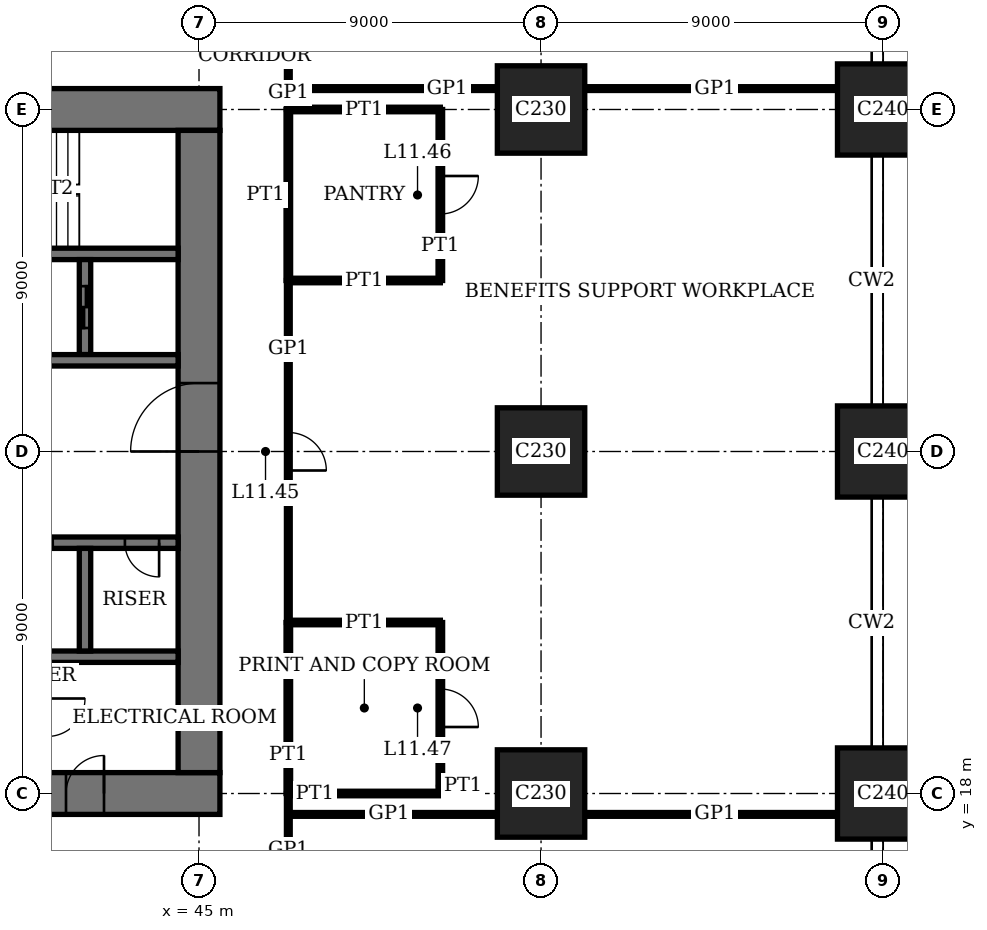
"""IFC4 building model, lengths in metres.
Left out: names, types, materials, properties, quantities, classifications, styles, units other than length and angle.
Written with IfcOpenShell. Run it as: python <this file> out.ifc"""

import sys

from ifc_helpers import new_model, si_unit, direction, frame, frame_2d, origin, origin_2d, place, context, subcontext, project, spatial, rectangle, extrude, element, fill, save


model = new_model("IFC4")
c1 = context("Model", 3, precision=1e-05, world=origin(), true_north=direction((0.0, 1.0)))
c2 = subcontext(c1, "Body", "Model", "MODEL_VIEW")
j1 = project(units=[si_unit("LENGTHUNIT", "METRE"), si_unit("PLANEANGLEUNIT", "RADIAN")], contexts=[c1])
p1 = place(None, origin())
s1 = spatial("IfcSite", under=j1, at=p1, CompositionType="ELEMENT")
p2 = place(p1, origin())
s2 = spatial("IfcBuilding", under=s1, at=p2, CompositionType="ELEMENT")
p3 = place(p2, frame((0.0, 0.0, 47.8)))
s3 = spatial("IfcBuildingStorey", under=s2, at=p3, CompositionType="ELEMENT", Elevation=47.8)
for number, where, z_axis, x_axis in (
    (1, (54.0, 18.0, 0.0), (0.0, 0.0, 1.0), (1.0, 0.0, 0.0)),
    (2, (54.0, 27.0, 0.0), (0.0, 0.0, 1.0), (1.0, 0.0, 0.0)),
    (3, (54.0, 36.0, 0.0), (0.0, 0.0, 1.0), (1.0, 0.0, 0.0)),
):
    element("IfcColumn", number, at=place(p3, frame(where, z_axis=z_axis, x_axis=x_axis)), inside=s3, PredefinedType="COLUMN", context=c2, shape_type="SweptSolid", body=[
        extrude(rectangle(XDim=2.3, YDim=2.3, at=origin_2d()), origin(), (0.0, 0.0, 1.0), 4.0),
    ])
for number, where, z_axis, x_axis in (
    (4, (63.0, 18.0, 0.0), (0.0, 0.0, 1.0), (1.0, 0.0, 0.0)),
    (5, (63.0, 27.0, 0.0), (0.0, 0.0, 1.0), (1.0, 0.0, 0.0)),
    (6, (63.0, 36.0, 0.0), (0.0, 0.0, 1.0), (1.0, 0.0, 0.0)),
):
    element("IfcColumn", number, at=place(p3, frame(where, z_axis=z_axis, x_axis=x_axis)), inside=s3, PredefinedType="COLUMN", context=c2, shape_type="SweptSolid", body=[
        extrude(rectangle(XDim=2.4, YDim=2.4, at=origin_2d()), origin(), (0.0, 0.0, 1.0), 4.0),
    ])
p4 = place(p3, frame((17.45, 18.0, 0.0), z_axis=(0.0, 0.0, 1.0), x_axis=(1.0, 0.0, 0.0)))
e7 = element("IfcWall", 7, at=p4, inside=s3, PredefinedType="SHEAR", context=c2, shape_type="SweptSolid", body=[
    extrude(rectangle(XDim=28.1, YDim=1.1, at=frame_2d((14.05, 0.0))), origin(), (0.0, 0.0, 1.0), 4.0),
])
p5 = place(p4, frame((11.55, 0.0, 0.0)))
e8 = element("IfcOpeningElement", 8, at=p5, cuts=e7, PredefinedType="OPENING", context=c2, shape_type="SweptSolid", body=[
    extrude(rectangle(XDim=1.0, YDim=2.4, at=frame_2d((0.5, 1.2))), frame((0.0, 0.56, 0.0), z_axis=(0.0, -1.0, 0.0), x_axis=(1.0, 0.0, 0.0)), (0.0, 0.0, 1.0), 1.12),
])
p6 = place(p4, frame((16.55, 0.0, 0.0)))
e9 = element("IfcOpeningElement", 9, at=p6, cuts=e7, PredefinedType="OPENING", context=c2, shape_type="SweptSolid", body=[
    extrude(rectangle(XDim=1.0, YDim=2.4, at=frame_2d((0.5, 1.2))), frame((0.0, 0.56, 0.0), z_axis=(0.0, -1.0, 0.0), x_axis=(1.0, 0.0, 0.0)), (0.0, 0.0, 1.0), 1.12),
])
p7 = place(p4, frame((20.0, 0.0, 0.0)))
e10 = element("IfcOpeningElement", 10, at=p7, cuts=e7, PredefinedType="OPENING", context=c2, shape_type="SweptSolid", body=[
    extrude(rectangle(XDim=1.1, YDim=2.4, at=frame_2d((0.55, 1.2))), frame((0.0, 0.56, 0.0), z_axis=(0.0, -1.0, 0.0), x_axis=(1.0, 0.0, 0.0)), (0.0, 0.0, 1.0), 1.12),
])
p8 = place(p4, frame((24.05, 0.0, 0.0)))
e11 = element("IfcOpeningElement", 11, at=p8, cuts=e7, PredefinedType="OPENING", context=c2, shape_type="SweptSolid", body=[
    extrude(rectangle(XDim=1.0, YDim=2.4, at=frame_2d((0.5, 1.2))), frame((0.0, 0.56, 0.0), z_axis=(0.0, -1.0, 0.0), x_axis=(1.0, 0.0, 0.0)), (0.0, 0.0, 1.0), 1.12),
])
p9 = place(p3, frame((45.55, 36.0, 0.0), z_axis=(0.0, 0.0, 1.0), x_axis=(-1.0, 0.0, 0.0)))
e12 = element("IfcWall", 12, at=p9, inside=s3, PredefinedType="SHEAR", context=c2, shape_type="SweptSolid", body=[
    extrude(rectangle(XDim=28.1, YDim=1.1, at=frame_2d((14.05, 0.0))), origin(), (0.0, 0.0, 1.0), 4.0),
])
p10 = place(p9, frame((11.55, 0.0, 0.0)))
e13 = element("IfcOpeningElement", 13, at=p10, cuts=e12, PredefinedType="OPENING", context=c2, shape_type="SweptSolid", body=[
    extrude(rectangle(XDim=1.0, YDim=2.4, at=frame_2d((0.5, 1.2))), frame((0.0, 0.56, 0.0), z_axis=(0.0, -1.0, 0.0), x_axis=(1.0, 0.0, 0.0)), (0.0, 0.0, 1.0), 1.12),
])
p11 = place(p9, frame((16.55, 0.0, 0.0)))
e14 = element("IfcOpeningElement", 14, at=p11, cuts=e12, PredefinedType="OPENING", context=c2, shape_type="SweptSolid", body=[
    extrude(rectangle(XDim=1.0, YDim=2.4, at=frame_2d((0.5, 1.2))), frame((0.0, 0.56, 0.0), z_axis=(0.0, -1.0, 0.0), x_axis=(1.0, 0.0, 0.0)), (0.0, 0.0, 1.0), 1.12),
])
p12 = place(p9, frame((20.0, 0.0, 0.0)))
e15 = element("IfcOpeningElement", 15, at=p12, cuts=e12, PredefinedType="OPENING", context=c2, shape_type="SweptSolid", body=[
    extrude(rectangle(XDim=1.1, YDim=2.4, at=frame_2d((0.55, 1.2))), frame((0.0, 0.56, 0.0), z_axis=(0.0, -1.0, 0.0), x_axis=(1.0, 0.0, 0.0)), (0.0, 0.0, 1.0), 1.12),
])
p13 = place(p9, frame((24.05, 0.0, 0.0)))
e16 = element("IfcOpeningElement", 16, at=p13, cuts=e12, PredefinedType="OPENING", context=c2, shape_type="SweptSolid", body=[
    extrude(rectangle(XDim=1.0, YDim=2.4, at=frame_2d((0.5, 1.2))), frame((0.0, 0.56, 0.0), z_axis=(0.0, -1.0, 0.0), x_axis=(1.0, 0.0, 0.0)), (0.0, 0.0, 1.0), 1.12),
])
p14 = place(p3, frame((45.0, 18.55, 0.0), z_axis=(0.0, 0.0, 1.0), x_axis=(0.0, 1.0, 0.0)))
e17 = element("IfcWall", 17, at=p14, inside=s3, PredefinedType="SHEAR", context=c2, shape_type="SweptSolid", body=[
    extrude(rectangle(XDim=16.9, YDim=1.1, at=frame_2d((8.45, 0.0))), origin(), (0.0, 0.0, 1.0), 4.0),
])
p15 = place(p14, frame((8.45, 0.0, 0.0)))
e18 = element("IfcOpeningElement", 18, at=p15, cuts=e17, PredefinedType="OPENING", context=c2, shape_type="SweptSolid", body=[
    extrude(rectangle(XDim=1.8, YDim=2.4, at=frame_2d((0.9, 1.2))), frame((0.0, 0.56, 0.0), z_axis=(0.0, -1.0, 0.0), x_axis=(1.0, 0.0, 0.0)), (0.0, 0.0, 1.0), 1.12),
])
p16 = place(p3, frame((36.15, 32.2, 0.0), z_axis=(0.0, 0.0, 1.0), x_axis=(1.0, 0.0, 0.0)))
e19 = element("IfcWall", 19, at=p16, inside=s3, PredefinedType="SHEAR", context=c2, shape_type="SweptSolid", body=[
    extrude(rectangle(XDim=8.3, YDim=0.3, at=frame_2d((4.15, 0.0))), origin(), (0.0, 0.0, 1.0), 4.0),
])
p17 = place(p16, frame((0.45, 0.0, 0.0)))
e20 = element("IfcOpeningElement", 20, at=p17, cuts=e19, PredefinedType="OPENING", context=c2, shape_type="SweptSolid", body=[
    extrude(rectangle(XDim=1.0, YDim=2.4, at=frame_2d((0.5, 1.2))), frame((0.0, 0.16, 0.0), z_axis=(0.0, -1.0, 0.0), x_axis=(1.0, 0.0, 0.0)), (0.0, 0.0, 1.0), 0.32),
])
p18 = place(p3, frame((42.0, 29.55, 0.0), z_axis=(0.0, 0.0, 1.0), x_axis=(0.0, 1.0, 0.0)))
e21 = element("IfcWall", 21, at=p18, inside=s3, PredefinedType="SHEAR", context=c2, shape_type="SweptSolid", body=[
    extrude(rectangle(XDim=2.5, YDim=0.3, at=frame_2d((1.25, 0.0))), origin(), (0.0, 0.0, 1.0), 4.0),
])
p19 = place(p18, frame((0.7, 0.0, 0.0)))
e22 = element("IfcOpeningElement", 22, at=p19, cuts=e21, PredefinedType="OPENING", context=c2, shape_type="SweptSolid", body=[
    extrude(rectangle(XDim=1.1, YDim=2.4, at=frame_2d((0.55, 1.2))), frame((0.0, 0.16, 0.0), z_axis=(0.0, -1.0, 0.0), x_axis=(1.0, 0.0, 0.0)), (0.0, 0.0, 1.0), 0.32),
])
p20 = place(p3, frame((18.55, 24.6, 0.0), z_axis=(0.0, 0.0, 1.0), x_axis=(1.0, 0.0, 0.0)))
e23 = element("IfcWall", 23, at=p20, inside=s3, PredefinedType="SHEAR", context=c2, shape_type="SweptSolid", body=[
    extrude(rectangle(XDim=25.9, YDim=0.3, at=frame_2d((12.95, 0.0))), origin(), (0.0, 0.0, 1.0), 4.0),
])
p21 = place(p20, frame((4.95, 0.0, 0.0)))
e24 = element("IfcOpeningElement", 24, at=p21, cuts=e23, PredefinedType="OPENING", context=c2, shape_type="SweptSolid", body=[
    extrude(rectangle(XDim=1.0, YDim=2.4, at=frame_2d((0.5, 1.2))), frame((0.0, 0.16, 0.0), z_axis=(0.0, -1.0, 0.0), x_axis=(1.0, 0.0, 0.0)), (0.0, 0.0, 1.0), 0.32),
])
p22 = place(p20, frame((24.5, 0.0, 0.0)))
e25 = element("IfcOpeningElement", 25, at=p22, cuts=e23, PredefinedType="OPENING", context=c2, shape_type="SweptSolid", body=[
    extrude(rectangle(XDim=0.9, YDim=2.1, at=frame_2d((0.45, 1.05))), frame((0.0, 0.16, 0.0), z_axis=(0.0, -1.0, 0.0), x_axis=(1.0, 0.0, 0.0)), (0.0, 0.0, 1.0), 0.32),
])
p23 = place(p20, frame((9.4, 0.0, 0.0)))
e26 = element("IfcOpeningElement", 26, at=p23, cuts=e23, PredefinedType="OPENING", context=c2, shape_type="SweptSolid", body=[
    extrude(rectangle(XDim=1.1, YDim=2.4, at=frame_2d((0.55, 1.2))), frame((0.0, 0.16, 0.0), z_axis=(0.0, -1.0, 0.0), x_axis=(1.0, 0.0, 0.0)), (0.0, 0.0, 1.0), 0.32),
])
p24 = place(p20, frame((12.4, 0.0, 0.0)))
e27 = element("IfcOpeningElement", 27, at=p24, cuts=e23, PredefinedType="OPENING", context=c2, shape_type="SweptSolid", body=[
    extrude(rectangle(XDim=1.1, YDim=2.4, at=frame_2d((0.55, 1.2))), frame((0.0, 0.16, 0.0), z_axis=(0.0, -1.0, 0.0), x_axis=(1.0, 0.0, 0.0)), (0.0, 0.0, 1.0), 0.32),
])
p25 = place(p20, frame((15.4, 0.0, 0.0)))
e28 = element("IfcOpeningElement", 28, at=p25, cuts=e23, PredefinedType="OPENING", context=c2, shape_type="SweptSolid", body=[
    extrude(rectangle(XDim=1.1, YDim=2.4, at=frame_2d((0.55, 1.2))), frame((0.0, 0.16, 0.0), z_axis=(0.0, -1.0, 0.0), x_axis=(1.0, 0.0, 0.0)), (0.0, 0.0, 1.0), 0.32),
])
p26 = place(p20, frame((18.4, 0.0, 0.0)))
e29 = element("IfcOpeningElement", 29, at=p26, cuts=e23, PredefinedType="OPENING", context=c2, shape_type="SweptSolid", body=[
    extrude(rectangle(XDim=1.1, YDim=2.4, at=frame_2d((0.55, 1.2))), frame((0.0, 0.16, 0.0), z_axis=(0.0, -1.0, 0.0), x_axis=(1.0, 0.0, 0.0)), (0.0, 0.0, 1.0), 0.32),
])
p27 = place(p20, frame((21.3, 0.0, 0.0)))
e30 = element("IfcOpeningElement", 30, at=p27, cuts=e23, PredefinedType="OPENING", context=c2, shape_type="SweptSolid", body=[
    extrude(rectangle(XDim=1.3, YDim=2.4, at=frame_2d((0.65, 1.2))), frame((0.0, 0.16, 0.0), z_axis=(0.0, -1.0, 0.0), x_axis=(1.0, 0.0, 0.0)), (0.0, 0.0, 1.0), 0.32),
])
p28 = place(p3, frame((18.55, 29.4, 0.0), z_axis=(0.0, 0.0, 1.0), x_axis=(1.0, 0.0, 0.0)))
e31 = element("IfcWall", 31, at=p28, inside=s3, PredefinedType="SHEAR", context=c2, shape_type="SweptSolid", body=[
    extrude(rectangle(XDim=25.9, YDim=0.3, at=frame_2d((12.95, 0.0))), origin(), (0.0, 0.0, 1.0), 4.0),
])
p29 = place(p28, frame((19.95, 0.0, 0.0)))
e32 = element("IfcOpeningElement", 32, at=p29, cuts=e31, PredefinedType="OPENING", context=c2, shape_type="SweptSolid", body=[
    extrude(rectangle(XDim=1.0, YDim=2.4, at=frame_2d((0.5, 1.2))), frame((0.0, 0.16, 0.0), z_axis=(0.0, -1.0, 0.0), x_axis=(1.0, 0.0, 0.0)), (0.0, 0.0, 1.0), 0.32),
])
p30 = place(p28, frame((0.5, 0.0, 0.0)))
e33 = element("IfcOpeningElement", 33, at=p30, cuts=e31, PredefinedType="OPENING", context=c2, shape_type="SweptSolid", body=[
    extrude(rectangle(XDim=0.9, YDim=2.1, at=frame_2d((0.45, 1.05))), frame((0.0, 0.16, 0.0), z_axis=(0.0, -1.0, 0.0), x_axis=(1.0, 0.0, 0.0)), (0.0, 0.0, 1.0), 0.32),
])
p31 = place(p28, frame((3.3, 0.0, 0.0)))
e34 = element("IfcOpeningElement", 34, at=p31, cuts=e31, PredefinedType="OPENING", context=c2, shape_type="SweptSolid", body=[
    extrude(rectangle(XDim=1.3, YDim=2.4, at=frame_2d((0.65, 1.2))), frame((0.0, 0.16, 0.0), z_axis=(0.0, -1.0, 0.0), x_axis=(1.0, 0.0, 0.0)), (0.0, 0.0, 1.0), 0.32),
])
p32 = place(p3, frame((27.15, 21.6, 0.0), z_axis=(0.0, 0.0, 1.0), x_axis=(1.0, 0.0, 0.0)))
e35 = element("IfcWall", 35, at=p32, inside=s3, PredefinedType="SHEAR", context=c2, shape_type="SweptSolid", body=[
    extrude(rectangle(XDim=17.3, YDim=0.3, at=frame_2d((8.65, 0.0))), origin(), (0.0, 0.0, 1.0), 4.0),
])
p33 = place(p3, frame((42.0, 21.75, 0.0), z_axis=(0.0, 0.0, 1.0), x_axis=(0.0, 1.0, 0.0)))
e36 = element("IfcWall", 36, at=p33, inside=s3, PredefinedType="SHEAR", context=c2, shape_type="SweptSolid", body=[
    extrude(rectangle(XDim=2.7, YDim=0.3, at=frame_2d((1.35, 0.0))), origin(), (0.0, 0.0, 1.0), 4.0),
])
p34 = place(p3, frame((47.35, 17.45, 0.0), z_axis=(0.0, 0.0, 1.0), x_axis=(1.0, 0.0, 0.0)))
e37 = element("IfcWall", 37, at=p34, inside=s3, PredefinedType="PARTITIONING", context=c2, shape_type="SweptSolid", body=[
    extrude(rectangle(XDim=5.5, YDim=0.1, at=frame_2d((2.75, 0.0))), origin(), (0.0, 0.0, 1.0), 3.75),
])
p35 = place(p3, frame((55.15, 17.45, 0.0), z_axis=(0.0, 0.0, 1.0), x_axis=(1.0, 0.0, 0.0)))
e38 = element("IfcWall", 38, at=p35, inside=s3, PredefinedType="PARTITIONING", context=c2, shape_type="SweptSolid", body=[
    extrude(rectangle(XDim=6.65, YDim=0.1, at=frame_2d((3.325, 0.0))), origin(), (0.0, 0.0, 1.0), 3.75),
])
p36 = place(p3, frame((47.35, 18.0, 0.0), z_axis=(0.0, 0.0, 1.0), x_axis=(1.0, 0.0, 0.0)))
e39 = element("IfcWall", 39, at=p36, inside=s3, PredefinedType="PARTITIONING", context=c2, shape_type="SweptSolid", body=[
    extrude(rectangle(XDim=4.0, YDim=0.12, at=frame_2d((2.0, 0.0))), origin(), (0.0, 0.0, 1.0), 3.05),
])
for number, where, z_axis, x_axis in (
    (40, (47.35, 22.5, 0.0), (0.0, 0.0, 1.0), (1.0, 0.0, 0.0)),
    (41, (47.35, 31.5, 0.0), (0.0, 0.0, 1.0), (1.0, 0.0, 0.0)),
):
    element("IfcWall", number, at=place(p3, frame(where, z_axis=z_axis, x_axis=x_axis)), inside=s3, PredefinedType="PARTITIONING", context=c2, shape_type="SweptSolid", body=[
        extrude(rectangle(XDim=4.0, YDim=0.12, at=frame_2d((2.0, 0.0))), origin(), (0.0, 0.0, 1.0), 3.1),
    ])
p37 = place(p3, frame((47.35, 36.0, 0.0), z_axis=(0.0, 0.0, 1.0), x_axis=(1.0, 0.0, 0.0)))
e42 = element("IfcWall", 42, at=p37, inside=s3, PredefinedType="PARTITIONING", context=c2, shape_type="SweptSolid", body=[
    extrude(rectangle(XDim=4.0, YDim=0.12, at=frame_2d((2.0, 0.0))), origin(), (0.0, 0.0, 1.0), 3.05),
])
p38 = place(p3, frame((47.35, 36.55, 0.0), z_axis=(0.0, 0.0, 1.0), x_axis=(1.0, 0.0, 0.0)))
e43 = element("IfcWall", 43, at=p38, inside=s3, PredefinedType="PARTITIONING", context=c2, shape_type="SweptSolid", body=[
    extrude(rectangle(XDim=5.5, YDim=0.1, at=frame_2d((2.75, 0.0))), origin(), (0.0, 0.0, 1.0), 3.75),
])
p39 = place(p3, frame((55.15, 36.55, 0.0), z_axis=(0.0, 0.0, 1.0), x_axis=(1.0, 0.0, 0.0)))
e44 = element("IfcWall", 44, at=p39, inside=s3, PredefinedType="PARTITIONING", context=c2, shape_type="SweptSolid", body=[
    extrude(rectangle(XDim=6.65, YDim=0.1, at=frame_2d((3.325, 0.0))), origin(), (0.0, 0.0, 1.0), 3.75),
])
for number, where, z_axis, x_axis in (
    (45, (47.35, 31.5, 0.0), (0.0, 0.0, 1.0), (0.0, 1.0, 0.0)),
    (46, (47.35, 18.0, 0.0), (0.0, 0.0, 1.0), (0.0, 1.0, 0.0)),
):
    element("IfcWall", number, at=place(p3, frame(where, z_axis=z_axis, x_axis=x_axis)), inside=s3, PredefinedType="PARTITIONING", context=c2, shape_type="SweptSolid", body=[
        extrude(rectangle(XDim=4.5, YDim=0.12, at=frame_2d((2.25, 0.0))), origin(), (0.0, 0.0, 1.0), 3.75),
    ])
p40 = place(p3, frame((47.35, 15.65, 0.0), z_axis=(0.0, 0.0, 1.0), x_axis=(0.0, 1.0, 0.0)))
e47 = element("IfcWall", 47, at=p40, inside=s3, PredefinedType="PARTITIONING", context=c2, shape_type="SweptSolid", body=[
    extrude(rectangle(XDim=2.35, YDim=0.1, at=frame_2d((1.175, 0.0))), origin(), (0.0, 0.0, 1.0), 3.75),
])
p41 = place(p3, frame((47.35, 22.5, 0.0), z_axis=(0.0, 0.0, 1.0), x_axis=(0.0, 1.0, 0.0)))
e48 = element("IfcWall", 48, at=p41, inside=s3, PredefinedType="PARTITIONING", context=c2, shape_type="SweptSolid", body=[
    extrude(rectangle(XDim=9.0, YDim=0.1, at=frame_2d((4.5, 0.0))), origin(), (0.0, 0.0, 1.0), 3.75),
])
p42 = place(p41, frame((4.0, 0.0, 0.0)))
e49 = element("IfcOpeningElement", 49, at=p42, cuts=e48, PredefinedType="OPENING", context=c2, shape_type="SweptSolid", body=[
    extrude(rectangle(XDim=1.0, YDim=2.4, at=frame_2d((0.5, 1.2))), frame((0.0, 0.06, 0.0), z_axis=(0.0, -1.0, 0.0), x_axis=(1.0, 0.0, 0.0)), (0.0, 0.0, 1.0), 0.12),
])
p43 = place(p3, frame((47.35, 36.0, 0.0), z_axis=(0.0, 0.0, 1.0), x_axis=(0.0, 1.0, 0.0)))
e50 = element("IfcWall", 50, at=p43, inside=s3, PredefinedType="PARTITIONING", context=c2, shape_type="SweptSolid", body=[
    extrude(rectangle(XDim=2.35, YDim=0.1, at=frame_2d((1.175, 0.0))), origin(), (0.0, 0.0, 1.0), 3.75),
])
p44 = place(p3, frame((51.35, 31.5, 0.0), z_axis=(0.0, 0.0, 1.0), x_axis=(0.0, 1.0, 0.0)))
e51 = element("IfcWall", 51, at=p44, inside=s3, PredefinedType="PARTITIONING", context=c2, shape_type="SweptSolid", body=[
    extrude(rectangle(XDim=4.5, YDim=0.12, at=frame_2d((2.25, 0.0))), origin(), (0.0, 0.0, 1.0), 3.75),
])
p45 = place(p44, frame((1.75, 0.0, 0.0)))
e52 = element("IfcOpeningElement", 52, at=p45, cuts=e51, PredefinedType="OPENING", context=c2, shape_type="SweptSolid", body=[
    extrude(rectangle(XDim=1.0, YDim=2.4, at=frame_2d((0.5, 1.2))), frame((0.0, 0.07, 0.0), z_axis=(0.0, -1.0, 0.0), x_axis=(1.0, 0.0, 0.0)), (0.0, 0.0, 1.0), 0.14),
])
p46 = place(p3, frame((51.35, 18.0, 0.0), z_axis=(0.0, 0.0, 1.0), x_axis=(0.0, 1.0, 0.0)))
e53 = element("IfcWall", 53, at=p46, inside=s3, PredefinedType="PARTITIONING", context=c2, shape_type="SweptSolid", body=[
    extrude(rectangle(XDim=4.5, YDim=0.12, at=frame_2d((2.25, 0.0))), origin(), (0.0, 0.0, 1.0), 3.75),
])
p47 = place(p46, frame((1.75, 0.0, 0.0)))
e54 = element("IfcOpeningElement", 54, at=p47, cuts=e53, PredefinedType="OPENING", context=c2, shape_type="SweptSolid", body=[
    extrude(rectangle(XDim=1.0, YDim=2.4, at=frame_2d((0.5, 1.2))), frame((0.0, 0.07, 0.0), z_axis=(0.0, -1.0, 0.0), x_axis=(1.0, 0.0, 0.0)), (0.0, 0.0, 1.0), 0.14),
])
p48 = place(p15, origin())
e55 = element("IfcDoor", 55, at=p48, inside=s3, OperationType="DOUBLE_DOOR_DOUBLE_SWING", PredefinedType="DOOR", context=c2, shape_type="SweptSolid", body=[
    extrude(rectangle(XDim=1.8, YDim=2.4, at=frame_2d((0.9, 1.2))), frame((0.0, 0.03, 0.0), z_axis=(0.0, -1.0, 0.0), x_axis=(1.0, 0.0, 0.0)), (0.0, 0.0, 1.0), 0.06),
    extrude(rectangle(XDim=0.04, YDim=2.4, at=frame_2d((0.02, 1.2))), frame((0.0, 0.55, 0.0), z_axis=(0.0, -1.0, 0.0), x_axis=(1.0, 0.0, 0.0)), (0.0, 0.0, 1.0), 1.1),
    extrude(rectangle(XDim=0.04, YDim=2.4, at=frame_2d((1.78, 1.2))), frame((0.0, 0.55, 0.0), z_axis=(0.0, -1.0, 0.0), x_axis=(1.0, 0.0, 0.0)), (0.0, 0.0, 1.0), 1.1),
    extrude(rectangle(XDim=1.8, YDim=0.04, at=frame_2d((0.9, 2.38))), frame((0.0, 0.55, 0.0), z_axis=(0.0, -1.0, 0.0), x_axis=(1.0, 0.0, 0.0)), (0.0, 0.0, 1.0), 1.1),
])
fill(e18, e55)
p49 = place(p8, origin())
e56 = element("IfcDoor", 56, at=p49, inside=s3, OperationType="SINGLE_SWING_LEFT", PredefinedType="DOOR", context=c2, shape_type="SweptSolid", body=[
    extrude(rectangle(XDim=1.0, YDim=2.4, at=frame_2d((0.5, 1.2))), frame((0.0, 0.025, 0.0), z_axis=(0.0, -1.0, 0.0), x_axis=(1.0, 0.0, 0.0)), (0.0, 0.0, 1.0), 0.05),
    extrude(rectangle(XDim=0.04, YDim=2.4, at=frame_2d((0.02, 1.2))), frame((0.0, 0.4, 0.0), z_axis=(0.0, -1.0, 0.0), x_axis=(1.0, 0.0, 0.0)), (0.0, 0.0, 1.0), 0.8),
    extrude(rectangle(XDim=0.04, YDim=2.4, at=frame_2d((0.98, 1.2))), frame((0.0, 0.4, 0.0), z_axis=(0.0, -1.0, 0.0), x_axis=(1.0, 0.0, 0.0)), (0.0, 0.0, 1.0), 0.8),
    extrude(rectangle(XDim=1.0, YDim=0.04, at=frame_2d((0.5, 2.38))), frame((0.0, 0.4, 0.0), z_axis=(0.0, -1.0, 0.0), x_axis=(1.0, 0.0, 0.0)), (0.0, 0.0, 1.0), 0.8),
])
fill(e11, e56)
p50 = place(p22, origin())
e57 = element("IfcDoor", 57, at=p50, inside=s3, OperationType="SINGLE_SWING_RIGHT", PredefinedType="DOOR", context=c2, shape_type="SweptSolid", body=[
    extrude(rectangle(XDim=0.9, YDim=2.1, at=frame_2d((0.45, 1.05))), frame((0.0, 0.03, 0.0), z_axis=(0.0, -1.0, 0.0), x_axis=(1.0, 0.0, 0.0)), (0.0, 0.0, 1.0), 0.06),
])
fill(e25, e57)
p51 = place(p42, origin())
e58 = element("IfcDoor", 58, at=p51, inside=s3, OperationType="SINGLE_SWING_LEFT", PredefinedType="DOOR", context=c2, shape_type="SweptSolid", body=[
    extrude(rectangle(XDim=1.0, YDim=2.4, at=frame_2d((0.5, 1.2))), frame((0.0, 0.02, 0.0), z_axis=(0.0, -1.0, 0.0), x_axis=(1.0, 0.0, 0.0)), (0.0, 0.0, 1.0), 0.04),
])
fill(e49, e58)
p52 = place(p45, origin())
e59 = element("IfcDoor", 59, at=p52, inside=s3, OperationType="SINGLE_SWING_RIGHT", PredefinedType="DOOR", context=c2, shape_type="SweptSolid", body=[
    extrude(rectangle(XDim=1.0, YDim=2.4, at=frame_2d((0.5, 1.2))), frame((0.0, 0.025, 0.0), z_axis=(0.0, -1.0, 0.0), x_axis=(1.0, 0.0, 0.0)), (0.0, 0.0, 1.0), 0.05),
])
fill(e52, e59)
p53 = place(p47, origin())
e60 = element("IfcDoor", 60, at=p53, inside=s3, OperationType="SINGLE_SWING_LEFT", PredefinedType="DOOR", context=c2, shape_type="SweptSolid", body=[
    extrude(rectangle(XDim=1.0, YDim=2.4, at=frame_2d((0.5, 1.2))), frame((0.0, 0.025, 0.0), z_axis=(0.0, -1.0, 0.0), x_axis=(1.0, 0.0, 0.0)), (0.0, 0.0, 1.0), 0.05),
])
fill(e54, e60)
p54 = place(p27, origin())
e61 = element("IfcDoor", 61, at=p54, inside=s3, OperationType="DOUBLE_DOOR_SLIDING", PredefinedType="DOOR", context=c2, shape_type="SweptSolid", body=[
    extrude(rectangle(XDim=1.3, YDim=2.4, at=frame_2d((0.65, 1.2))), frame((0.0, 0.02, 0.0), z_axis=(0.0, -1.0, 0.0), x_axis=(1.0, 0.0, 0.0)), (0.0, 0.0, 1.0), 0.04),
])
fill(e30, e61)
p55 = place(p19, origin())
e62 = element("IfcDoor", 62, at=p55, inside=s3, OperationType="DOUBLE_DOOR_SLIDING", PredefinedType="DOOR", context=c2, shape_type="SweptSolid", body=[
    extrude(rectangle(XDim=1.1, YDim=2.4, at=frame_2d((0.55, 1.2))), frame((0.0, 0.03, 0.0), z_axis=(0.0, -1.0, 0.0), x_axis=(1.0, 0.0, 0.0)), (0.0, 0.0, 1.0), 0.06),
])
fill(e22, e62)
save(model, sys.argv[1])
